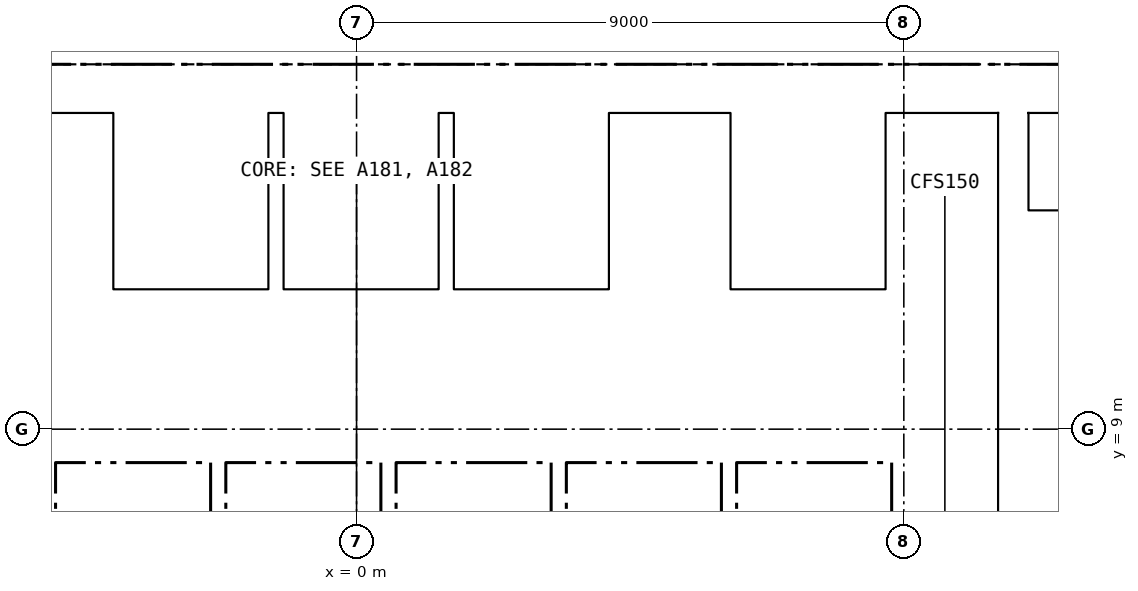
"""IFC4 building model, lengths in metres.
Left out: names, types, materials, properties, quantities, classifications, styles, units other than length and angle.
Written with IfcOpenShell. Run it as: python <this file> out.ifc"""

import sys

from ifc_helpers import new_model, si_unit, direction, frame, frame_2d, origin, place, context, subcontext, project, spatial, rectangle, extrude, element, fill, save


model = new_model("IFC4")
c1 = context("Model", 3, precision=1e-05, world=origin(), true_north=direction((0.0, 1.0)))
c2 = subcontext(c1, "Body", "Model", "MODEL_VIEW")
j1 = project(units=[si_unit("LENGTHUNIT", "METRE"), si_unit("PLANEANGLEUNIT", "RADIAN")], contexts=[c1])
p1 = place(None, origin())
s1 = spatial("IfcSite", under=j1, at=p1, CompositionType="ELEMENT")
p2 = place(p1, origin())
s2 = spatial("IfcBuilding", under=s1, at=p2, CompositionType="ELEMENT")
p3 = place(p2, frame((0.0, 0.0, 137.1)))
s3 = spatial("IfcBuildingStorey", under=s2, at=p3, CompositionType="ELEMENT", Elevation=137.1)
p4 = place(p3, frame((-15.0, 14.6, -0.15), z_axis=(0.0, 0.0, 1.0), x_axis=(1.0, 0.0, 0.0)))
e1 = element("IfcWall", 1, at=p4, inside=s3, PredefinedType="SOLIDWALL", context=c2, shape_type="SweptSolid", body=[
    extrude(rectangle(XDim=30.0, YDim=0.8, at=frame_2d((15.0, 0.0))), origin(), (0.0, 0.0, 1.0), 3.65),
])
p5 = place(p4, frame((9.25, 0.0, 0.15)))
e2 = element("IfcOpeningElement", 2, at=p5, cuts=e1, PredefinedType="OPENING", context=c2, shape_type="SweptSolid", body=[
    extrude(rectangle(XDim=1.5, YDim=2.1, at=frame_2d((0.75, 1.05))), frame((0.0, 0.41, 0.0), z_axis=(0.0, -1.0, 0.0), x_axis=(1.0, 0.0, 0.0)), (0.0, 0.0, 1.0), 0.82),
])
p6 = place(p4, frame((19.4, 0.0, 0.15)))
e3 = element("IfcOpeningElement", 3, at=p6, cuts=e1, PredefinedType="OPENING", context=c2, shape_type="SweptSolid", body=[
    extrude(rectangle(XDim=1.5, YDim=2.1, at=frame_2d((0.75, 1.05))), frame((0.0, 0.41, 0.0), z_axis=(0.0, -1.0, 0.0), x_axis=(1.0, 0.0, 0.0)), (0.0, 0.0, 1.0), 0.82),
])
p7 = place(p4, frame((1.5, 0.0, 0.15)))
e4 = element("IfcOpeningElement", 4, at=p7, cuts=e1, PredefinedType="OPENING", context=c2, shape_type="SweptSolid", body=[
    extrude(rectangle(XDim=1.2, YDim=2.1, at=frame_2d((0.6, 1.05))), frame((0.0, 0.41, 0.0), z_axis=(0.0, -1.0, 0.0), x_axis=(1.0, 0.0, 0.0)), (0.0, 0.0, 1.0), 0.82),
])
p8 = place(p4, frame((27.3, 0.0, 0.15)))
e5 = element("IfcOpeningElement", 5, at=p8, cuts=e1, PredefinedType="OPENING", context=c2, shape_type="SweptSolid", body=[
    extrude(rectangle(XDim=1.2, YDim=2.1, at=frame_2d((0.6, 1.05))), frame((0.0, 0.41, 0.0), z_axis=(0.0, -1.0, 0.0), x_axis=(1.0, 0.0, 0.0)), (0.0, 0.0, 1.0), 0.82),
])
p9 = place(p3, frame((10.8, 0.8, -0.15), z_axis=(0.0, 0.0, 1.0), x_axis=(0.0, 1.0, 0.0)))
e6 = element("IfcWall", 6, at=p9, inside=s3, PredefinedType="SOLIDWALL", context=c2, shape_type="SweptSolid", body=[
    extrude(rectangle(XDim=13.4, YDim=0.5, at=frame_2d((6.7, 0.0))), origin(), (0.0, 0.0, 1.0), 3.65),
])
p10 = place(p3, frame((-10.55, 8.55, 0.0), z_axis=(0.0, 0.0, 1.0), x_axis=(1.0, 0.0, 0.0)))
e7 = element("IfcWall", 7, at=p10, inside=s3, PredefinedType="PARTITIONING", context=c2, shape_type="SweptSolid", body=[
    extrude(rectangle(XDim=21.1, YDim=0.2, at=frame_2d((10.55, 0.0))), origin(), (0.0, 0.0, 1.0), 3.5),
])
p11 = place(p10, frame((0.675, 0.0, 0.0)))
e8 = element("IfcOpeningElement", 8, at=p11, cuts=e7, PredefinedType="OPENING", context=c2, shape_type="SweptSolid", body=[
    extrude(rectangle(XDim=1.2, YDim=2.1, at=frame_2d((0.6, 1.05))), frame((0.0, 0.11, 0.0), z_axis=(0.0, -1.0, 0.0), x_axis=(1.0, 0.0, 0.0)), (0.0, 0.0, 1.0), 0.22),
])
p12 = place(p10, frame((3.475, 0.0, 0.0)))
e9 = element("IfcOpeningElement", 9, at=p12, cuts=e7, PredefinedType="OPENING", context=c2, shape_type="SweptSolid", body=[
    extrude(rectangle(XDim=1.2, YDim=2.1, at=frame_2d((0.6, 1.05))), frame((0.0, 0.11, 0.0), z_axis=(0.0, -1.0, 0.0), x_axis=(1.0, 0.0, 0.0)), (0.0, 0.0, 1.0), 0.22),
])
p13 = place(p10, frame((6.275, 0.0, 0.0)))
e10 = element("IfcOpeningElement", 10, at=p13, cuts=e7, PredefinedType="OPENING", context=c2, shape_type="SweptSolid", body=[
    extrude(rectangle(XDim=1.2, YDim=2.1, at=frame_2d((0.6, 1.05))), frame((0.0, 0.11, 0.0), z_axis=(0.0, -1.0, 0.0), x_axis=(1.0, 0.0, 0.0)), (0.0, 0.0, 1.0), 0.22),
])
p14 = place(p10, frame((9.075, 0.0, 0.0)))
e11 = element("IfcOpeningElement", 11, at=p14, cuts=e7, PredefinedType="OPENING", context=c2, shape_type="SweptSolid", body=[
    extrude(rectangle(XDim=1.2, YDim=2.1, at=frame_2d((0.6, 1.05))), frame((0.0, 0.11, 0.0), z_axis=(0.0, -1.0, 0.0), x_axis=(1.0, 0.0, 0.0)), (0.0, 0.0, 1.0), 0.22),
])
p15 = place(p10, frame((11.875, 0.0, 0.0)))
e12 = element("IfcOpeningElement", 12, at=p15, cuts=e7, PredefinedType="OPENING", context=c2, shape_type="SweptSolid", body=[
    extrude(rectangle(XDim=1.2, YDim=2.1, at=frame_2d((0.6, 1.05))), frame((0.0, 0.11, 0.0), z_axis=(0.0, -1.0, 0.0), x_axis=(1.0, 0.0, 0.0)), (0.0, 0.0, 1.0), 0.22),
])
p16 = place(p10, frame((14.675, 0.0, 0.0)))
e13 = element("IfcOpeningElement", 13, at=p16, cuts=e7, PredefinedType="OPENING", context=c2, shape_type="SweptSolid", body=[
    extrude(rectangle(XDim=1.2, YDim=2.1, at=frame_2d((0.6, 1.05))), frame((0.0, 0.11, 0.0), z_axis=(0.0, -1.0, 0.0), x_axis=(1.0, 0.0, 0.0)), (0.0, 0.0, 1.0), 0.22),
])
p17 = place(p10, frame((17.475, 0.0, 0.0)))
e14 = element("IfcOpeningElement", 14, at=p17, cuts=e7, PredefinedType="OPENING", context=c2, shape_type="SweptSolid", body=[
    extrude(rectangle(XDim=1.2, YDim=2.1, at=frame_2d((0.6, 1.05))), frame((0.0, 0.11, 0.0), z_axis=(0.0, -1.0, 0.0), x_axis=(1.0, 0.0, 0.0)), (0.0, 0.0, 1.0), 0.22),
])
p18 = place(p10, frame((19.9, 0.0, 0.0)))
e15 = element("IfcOpeningElement", 15, at=p18, cuts=e7, PredefinedType="OPENING", context=c2, shape_type="SweptSolid", body=[
    extrude(rectangle(XDim=0.9, YDim=2.1, at=frame_2d((0.45, 1.05))), frame((0.0, 0.11, 0.0), z_axis=(0.0, -1.0, 0.0), x_axis=(1.0, 0.0, 0.0)), (0.0, 0.0, 1.0), 0.22),
])
p19 = place(p3, frame((-4.25, 11.2, 0.0), z_axis=(0.0, 0.0, 1.0), x_axis=(1.0, 0.0, 0.0)))
e16 = element("IfcWall", 16, at=p19, inside=s3, PredefinedType="PARTITIONING", context=c2, shape_type="SweptSolid", body=[
    extrude(rectangle(XDim=8.65, YDim=0.2, at=frame_2d((4.325, 0.0))), origin(), (0.0, 0.0, 1.0), 3.5),
])
p20 = place(p19, frame((0.825, 0.0, 0.0)))
e17 = element("IfcOpeningElement", 17, at=p20, cuts=e16, PredefinedType="OPENING", context=c2, shape_type="SweptSolid", body=[
    extrude(rectangle(XDim=1.4, YDim=2.1, at=frame_2d((0.7, 1.05))), frame((0.0, 0.11, 0.0), z_axis=(0.0, -1.0, 0.0), x_axis=(1.0, 0.0, 0.0)), (0.0, 0.0, 1.0), 0.22),
])
p21 = place(p19, frame((3.625, 0.0, 0.0)))
e18 = element("IfcOpeningElement", 18, at=p21, cuts=e16, PredefinedType="OPENING", context=c2, shape_type="SweptSolid", body=[
    extrude(rectangle(XDim=1.4, YDim=2.1, at=frame_2d((0.7, 1.05))), frame((0.0, 0.11, 0.0), z_axis=(0.0, -1.0, 0.0), x_axis=(1.0, 0.0, 0.0)), (0.0, 0.0, 1.0), 0.22),
])
p22 = place(p3, frame((5.9, 11.2, 0.0), z_axis=(0.0, 0.0, 1.0), x_axis=(1.0, 0.0, 0.0)))
e19 = element("IfcWall", 19, at=p22, inside=s3, PredefinedType="PARTITIONING", context=c2, shape_type="SweptSolid", body=[
    extrude(rectangle(XDim=4.65, YDim=0.2, at=frame_2d((2.325, 0.0))), origin(), (0.0, 0.0, 1.0), 3.5),
])
p23 = place(p22, frame((3.4, 0.0, 0.0)))
e20 = element("IfcOpeningElement", 20, at=p23, cuts=e19, PredefinedType="OPENING", context=c2, shape_type="SweptSolid", body=[
    extrude(rectangle(XDim=0.9, YDim=2.1, at=frame_2d((0.45, 1.05))), frame((0.0, 0.11, 0.0), z_axis=(0.0, -1.0, 0.0), x_axis=(1.0, 0.0, 0.0)), (0.0, 0.0, 1.0), 0.22),
])
p24 = place(p3, frame((-4.125, 8.65, 0.0), z_axis=(0.0, 0.0, 1.0), x_axis=(0.0, 1.0, 0.0)))
e21 = element("IfcWall", 21, at=p24, inside=s3, PredefinedType="PARTITIONING", context=c2, shape_type="SweptSolid", body=[
    extrude(rectangle(XDim=2.45, YDim=0.25, at=frame_2d((1.225, 0.0))), origin(), (0.0, 0.0, 1.0), 3.5),
])
p25 = place(p24, frame((0.625, 0.0, 0.0)))
e22 = element("IfcOpeningElement", 22, at=p25, cuts=e21, PredefinedType="OPENING", context=c2, shape_type="SweptSolid", body=[
    extrude(rectangle(XDim=1.2, YDim=2.1, at=frame_2d((0.6, 1.05))), frame((0.0, 0.135, 0.0), z_axis=(0.0, -1.0, 0.0), x_axis=(1.0, 0.0, 0.0)), (0.0, 0.0, 1.0), 0.27),
])
for number, where, z_axis, x_axis in (
    (23, (-5.075, 6.15, 0.0), (0.0, 0.0, 1.0), (0.0, 1.0, 0.0)),
    (24, (-2.275, 6.15, 0.0), (0.0, 0.0, 1.0), (0.0, 1.0, 0.0)),
    (25, (0.525, 6.15, 0.0), (0.0, 0.0, 1.0), (0.0, 1.0, 0.0)),
    (26, (3.325, 6.15, 0.0), (0.0, 0.0, 1.0), (0.0, 1.0, 0.0)),
    (27, (6.125, 6.15, 0.0), (0.0, 0.0, 1.0), (0.0, 1.0, 0.0)),
    (28, (8.925, 6.15, 0.0), (0.0, 0.0, 1.0), (0.0, 1.0, 0.0)),
):
    element("IfcWall", number, at=place(p3, frame(where, z_axis=z_axis, x_axis=x_axis)), inside=s3, PredefinedType="PARTITIONING", context=c2, shape_type="SweptSolid", body=[
        extrude(rectangle(XDim=2.3, YDim=0.25, at=frame_2d((1.15, 0.0))), origin(), (0.0, 0.0, 1.0), 3.5),
    ])
for number, where, z_axis, x_axis in (
    (29, (-4.125, 11.3, 0.0), (0.0, 0.0, 1.0), (0.0, 1.0, 0.0)),
    (30, (-1.325, 11.3, 0.0), (0.0, 0.0, 1.0), (0.0, 1.0, 0.0)),
    (31, (1.475, 11.3, 0.0), (0.0, 0.0, 1.0), (0.0, 1.0, 0.0)),
    (32, (4.275, 11.3, 0.0), (0.0, 0.0, 1.0), (0.0, 1.0, 0.0)),
    (33, (6.025, 11.3, 0.0), (0.0, 0.0, 1.0), (0.0, 1.0, 0.0)),
    (34, (8.825, 11.3, 0.0), (0.0, 0.0, 1.0), (0.0, 1.0, 0.0)),
):
    element("IfcWall", number, at=place(p3, frame(where, z_axis=z_axis, x_axis=x_axis)), inside=s3, PredefinedType="PARTITIONING", context=c2, shape_type="SweptSolid", body=[
        extrude(rectangle(XDim=2.9, YDim=0.25, at=frame_2d((1.45, 0.0))), origin(), (0.0, 0.0, 1.0), 3.5),
    ])
p26 = place(p25, origin())
e35 = element("IfcDoor", 35, at=p26, inside=s3, OperationType="SINGLE_SWING_LEFT", PredefinedType="DOOR", context=c2, shape_type="SweptSolid", body=[
    extrude(rectangle(XDim=1.2, YDim=2.1, at=frame_2d((0.6, 1.05))), frame((0.0, 0.025, 0.0), z_axis=(0.0, -1.0, 0.0), x_axis=(1.0, 0.0, 0.0)), (0.0, 0.0, 1.0), 0.05),
])
fill(e22, e35)
p27 = place(p13, origin())
e36 = element("IfcDoor", 36, at=p27, inside=s3, OperationType="DOUBLE_DOOR_SLIDING", PredefinedType="DOOR", context=c2, shape_type="SweptSolid", body=[
    extrude(rectangle(XDim=1.2, YDim=2.1, at=frame_2d((0.6, 1.05))), frame((0.0, 0.025, 0.0), z_axis=(0.0, -1.0, 0.0), x_axis=(1.0, 0.0, 0.0)), (0.0, 0.0, 1.0), 0.05),
])
fill(e10, e36)
p28 = place(p14, origin())
e37 = element("IfcDoor", 37, at=p28, inside=s3, OperationType="DOUBLE_DOOR_SLIDING", PredefinedType="DOOR", context=c2, shape_type="SweptSolid", body=[
    extrude(rectangle(XDim=1.2, YDim=2.1, at=frame_2d((0.6, 1.05))), frame((0.0, 0.025, 0.0), z_axis=(0.0, -1.0, 0.0), x_axis=(1.0, 0.0, 0.0)), (0.0, 0.0, 1.0), 0.05),
])
fill(e11, e37)
p29 = place(p15, origin())
e38 = element("IfcDoor", 38, at=p29, inside=s3, OperationType="DOUBLE_DOOR_SLIDING", PredefinedType="DOOR", context=c2, shape_type="SweptSolid", body=[
    extrude(rectangle(XDim=1.2, YDim=2.1, at=frame_2d((0.6, 1.05))), frame((0.0, 0.025, 0.0), z_axis=(0.0, -1.0, 0.0), x_axis=(1.0, 0.0, 0.0)), (0.0, 0.0, 1.0), 0.05),
])
fill(e12, e38)
p30 = place(p16, origin())
e39 = element("IfcDoor", 39, at=p30, inside=s3, OperationType="DOUBLE_DOOR_SLIDING", PredefinedType="DOOR", context=c2, shape_type="SweptSolid", body=[
    extrude(rectangle(XDim=1.2, YDim=2.1, at=frame_2d((0.6, 1.05))), frame((0.0, 0.025, 0.0), z_axis=(0.0, -1.0, 0.0), x_axis=(1.0, 0.0, 0.0)), (0.0, 0.0, 1.0), 0.05),
])
fill(e13, e39)
p31 = place(p17, origin())
e40 = element("IfcDoor", 40, at=p31, inside=s3, OperationType="DOUBLE_DOOR_SLIDING", PredefinedType="DOOR", context=c2, shape_type="SweptSolid", body=[
    extrude(rectangle(XDim=1.2, YDim=2.1, at=frame_2d((0.6, 1.05))), frame((0.0, 0.025, 0.0), z_axis=(0.0, -1.0, 0.0), x_axis=(1.0, 0.0, 0.0)), (0.0, 0.0, 1.0), 0.05),
])
fill(e14, e40)
p32 = place(p18, origin())
e41 = element("IfcDoor", 41, at=p32, inside=s3, OperationType="SINGLE_SWING_RIGHT", PredefinedType="DOOR", context=c2, shape_type="SweptSolid", body=[
    extrude(rectangle(XDim=0.9, YDim=2.1, at=frame_2d((0.45, 1.05))), frame((0.0, 0.025, 0.0), z_axis=(0.0, -1.0, 0.0), x_axis=(1.0, 0.0, 0.0)), (0.0, 0.0, 1.0), 0.05),
])
fill(e15, e41)
p33 = place(p20, origin())
e42 = element("IfcDoor", 42, at=p33, inside=s3, OperationType="DOUBLE_DOOR_SLIDING", PredefinedType="DOOR", context=c2, shape_type="SweptSolid", body=[
    extrude(rectangle(XDim=1.4, YDim=2.1, at=frame_2d((0.7, 1.05))), frame((0.0, 0.025, 0.0), z_axis=(0.0, -1.0, 0.0), x_axis=(1.0, 0.0, 0.0)), (0.0, 0.0, 1.0), 0.05),
])
fill(e17, e42)
p34 = place(p21, origin())
e43 = element("IfcDoor", 43, at=p34, inside=s3, OperationType="DOUBLE_DOOR_SLIDING", PredefinedType="DOOR", context=c2, shape_type="SweptSolid", body=[
    extrude(rectangle(XDim=1.4, YDim=2.1, at=frame_2d((0.7, 1.05))), frame((0.0, 0.025, 0.0), z_axis=(0.0, -1.0, 0.0), x_axis=(1.0, 0.0, 0.0)), (0.0, 0.0, 1.0), 0.05),
])
fill(e18, e43)
p35 = place(p23, origin())
e44 = element("IfcDoor", 44, at=p35, inside=s3, OperationType="SINGLE_SWING_LEFT", PredefinedType="DOOR", context=c2, shape_type="SweptSolid", body=[
    extrude(rectangle(XDim=0.9, YDim=2.1, at=frame_2d((0.45, 1.05))), frame((0.0, 0.025, 0.0), z_axis=(0.0, -1.0, 0.0), x_axis=(1.0, 0.0, 0.0)), (0.0, 0.0, 1.0), 0.05),
])
fill(e20, e44)
p36 = place(p5, origin())
e45 = element("IfcDoor", 45, at=p36, inside=s3, OperationType="DOUBLE_DOOR_SINGLE_SWING", PredefinedType="DOOR", context=c2, shape_type="SweptSolid", body=[
    extrude(rectangle(XDim=1.5, YDim=2.1, at=frame_2d((0.75, 1.05))), frame((0.0, 0.025, 0.0), z_axis=(0.0, -1.0, 0.0), x_axis=(1.0, 0.0, 0.0)), (0.0, 0.0, 1.0), 0.05),
])
fill(e2, e45)
p37 = place(p6, origin())
e46 = element("IfcDoor", 46, at=p37, inside=s3, OperationType="DOUBLE_DOOR_SINGLE_SWING", PredefinedType="DOOR", context=c2, shape_type="SweptSolid", body=[
    extrude(rectangle(XDim=1.5, YDim=2.1, at=frame_2d((0.75, 1.05))), frame((0.0, 0.025, 0.0), z_axis=(0.0, -1.0, 0.0), x_axis=(1.0, 0.0, 0.0)), (0.0, 0.0, 1.0), 0.05),
])
fill(e3, e46)
save(model, sys.argv[1])
